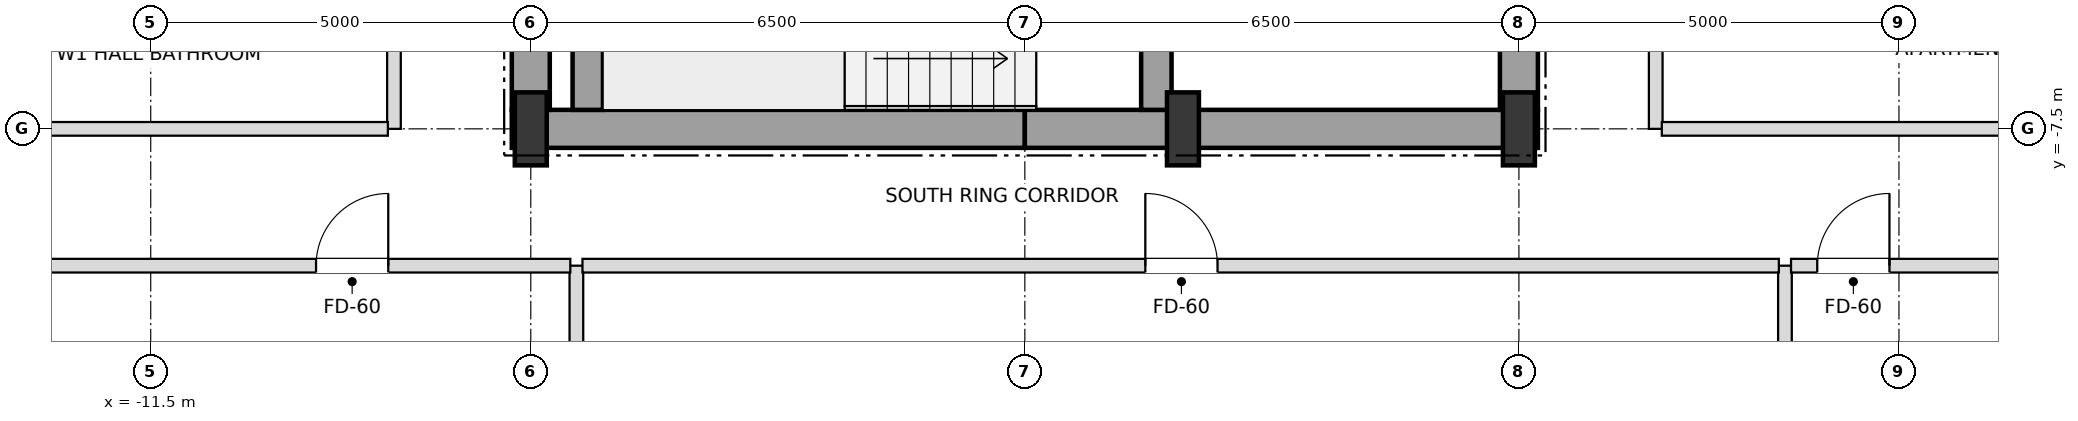
"""IFC4 building model, lengths in metres.
Left out: names, types, materials, properties, quantities, classifications, styles, units other than length and angle.
Written with IfcOpenShell. Run it as: python <this file> out.ifc"""

import sys

from ifc_helpers import new_model, si_unit, direction, frame, frame_2d, origin, origin_2d, place, context, subcontext, project, spatial, rectangle, i_section, extrude, element, fill, save


model = new_model("IFC4")
c1 = context("Model", 3, precision=1e-05, world=origin(), true_north=direction((0.0, 1.0)))
c2 = subcontext(c1, "Body", "Model", "MODEL_VIEW")
j1 = project(units=[si_unit("LENGTHUNIT", "METRE"), si_unit("PLANEANGLEUNIT", "RADIAN")], contexts=[c1])
p1 = place(None, origin())
s1 = spatial("IfcSite", under=j1, at=p1, CompositionType="ELEMENT")
p2 = place(p1, origin())
s2 = spatial("IfcBuilding", under=s1, at=p2, CompositionType="ELEMENT")
p3 = place(p2, frame((0.0, 0.0, 57.6)))
s3 = spatial("IfcBuildingStorey", under=s2, at=p3, CompositionType="ELEMENT", Elevation=57.6)
for number, where, z_axis, x_axis in (
    (1, (-6.5, -7.5, 0.0), (0.0, 0.0, 1.0), (1.0, 0.0, 0.0)),
    (2, (2.08, -7.5, 0.0), (0.0, 0.0, 1.0), (1.0, 0.0, 0.0)),
    (3, (6.5, -7.5, 0.0), (0.0, 0.0, 1.0), (1.0, 0.0, 0.0)),
):
    element("IfcColumn", number, at=place(p3, frame(where, z_axis=z_axis, x_axis=x_axis)), inside=s3, PredefinedType="COLUMN", context=c2, shape_type="SweptSolid", body=[
        extrude(i_section(OverallWidth=0.42, OverallDepth=0.96, WebThickness=0.022, FlangeThickness=0.034, at=origin_2d()), origin(), (0.0, 0.0, 1.0), 3.6),
    ])
for number, where, z_axis, x_axis in (
    (4, (-6.75, -7.5, 0.0), (0.0, 0.0, 1.0), (1.0, 0.0, 0.0)),
    (5, (0.0, -7.5, 0.0), (0.0, 0.0, 1.0), (1.0, 0.0, 0.0)),
):
    element("IfcWall", number, at=place(p3, frame(where, z_axis=z_axis, x_axis=x_axis)), inside=s3, PredefinedType="SHEAR", context=c2, shape_type="SweptSolid", body=[
        extrude(rectangle(XDim=6.75, YDim=0.5, at=frame_2d((3.375, 0.0))), origin(), (0.0, 0.0, 1.0), 3.38),
    ])
p4 = place(p3, frame((-6.5, -7.25, 0.0), z_axis=(0.0, 0.0, 1.0), x_axis=(0.0, 1.0, 0.0)))
e6 = element("IfcWall", 6, at=p4, inside=s3, PredefinedType="SHEAR", context=c2, shape_type="SweptSolid", body=[
    extrude(rectangle(XDim=3.55, YDim=0.5, at=frame_2d((1.775, 0.0))), origin(), (0.0, 0.0, 1.0), 3.38),
])
p5 = place(p3, frame((6.5, -7.25, 0.0), z_axis=(0.0, 0.0, 1.0), x_axis=(0.0, 1.0, 0.0)))
e7 = element("IfcWall", 7, at=p5, inside=s3, PredefinedType="SHEAR", context=c2, shape_type="SweptSolid", body=[
    extrude(rectangle(XDim=5.75, YDim=0.5, at=frame_2d((2.875, 0.0))), origin(), (0.0, 0.0, 1.0), 3.38),
])
p6 = place(p5, frame((0.85, 0.0, 0.0)))
e8 = element("IfcOpeningElement", 8, at=p6, cuts=e7, PredefinedType="OPENING", context=c2, shape_type="SweptSolid", body=[
    extrude(rectangle(XDim=1.05, YDim=2.15, at=frame_2d((0.525, 1.075))), frame((0.0, 0.26, 0.0), z_axis=(0.0, -1.0, 0.0), x_axis=(1.0, 0.0, 0.0)), (0.0, 0.0, 1.0), 0.52),
])
p7 = place(p3, frame((-5.75, -7.25, 0.0), z_axis=(0.0, 0.0, 1.0), x_axis=(0.0, 1.0, 0.0)))
e9 = element("IfcWall", 9, at=p7, inside=s3, PredefinedType="SHEAR", context=c2, shape_type="SweptSolid", body=[
    extrude(rectangle(XDim=2.9, YDim=0.4, at=frame_2d((1.45, 0.0))), origin(), (0.0, 0.0, 1.0), 3.38),
])
p8 = place(p3, frame((1.73, -7.25, 0.0), z_axis=(0.0, 0.0, 1.0), x_axis=(0.0, 1.0, 0.0)))
e10 = element("IfcWall", 10, at=p8, inside=s3, PredefinedType="SHEAR", context=c2, shape_type="SweptSolid", body=[
    extrude(rectangle(XDim=3.3, YDim=0.4, at=frame_2d((1.65, 0.0))), origin(), (0.0, 0.0, 1.0), 3.38),
])
p9 = place(p8, frame((0.9, 0.0, 0.0)))
e11 = element("IfcOpeningElement", 11, at=p9, cuts=e10, PredefinedType="OPENING", context=c2, shape_type="SweptSolid", body=[
    extrude(rectangle(XDim=1.05, YDim=2.15, at=frame_2d((0.525, 1.075))), frame((0.0, 0.21, 0.0), z_axis=(0.0, -1.0, 0.0), x_axis=(1.0, 0.0, 0.0)), (0.0, 0.0, 1.0), 0.42),
])
p10 = place(p3, frame((-8.3, -7.5, 0.0), z_axis=(0.0, 0.0, 1.0), x_axis=(0.0, 1.0, 0.0)))
e12 = element("IfcWall", 12, at=p10, inside=s3, PredefinedType="PARTITIONING", context=c2, shape_type="SweptSolid", body=[
    extrude(rectangle(XDim=15.0, YDim=0.18, at=frame_2d((7.5, 0.0))), origin(), (0.0, 0.0, 1.0), 3.38),
])
p11 = place(p10, frame((3.475, 0.0, 0.0)))
e13 = element("IfcOpeningElement", 13, at=p11, cuts=e12, PredefinedType="OPENING", context=c2, shape_type="SweptSolid", body=[
    extrude(rectangle(XDim=0.95, YDim=2.15, at=frame_2d((0.475, 1.075))), frame((0.0, 0.1, 0.0), z_axis=(0.0, -1.0, 0.0), x_axis=(1.0, 0.0, 0.0)), (0.0, 0.0, 1.0), 0.2),
])
p12 = place(p3, frame((-5.9, -24.9, 0.0), z_axis=(0.0, 0.0, 1.0), x_axis=(0.0, 1.0, 0.0)))
e14 = element("IfcWall", 14, at=p12, inside=s3, PredefinedType="PARTITIONING", context=c2, shape_type="SweptSolid", body=[
    extrude(rectangle(XDim=15.6, YDim=0.18, at=frame_2d((7.8, 0.0))), origin(), (0.0, 0.0, 1.0), 2.816),
])
p13 = place(p3, frame((8.3, -7.5, 0.0), z_axis=(0.0, 0.0, 1.0), x_axis=(0.0, 1.0, 0.0)))
e15 = element("IfcWall", 15, at=p13, inside=s3, PredefinedType="PARTITIONING", context=c2, shape_type="SweptSolid", body=[
    extrude(rectangle(XDim=15.0, YDim=0.18, at=frame_2d((7.5, 0.0))), origin(), (0.0, 0.0, 1.0), 3.38),
])
p14 = place(p13, frame((3.475, 0.0, 0.0)))
e16 = element("IfcOpeningElement", 16, at=p14, cuts=e15, PredefinedType="OPENING", context=c2, shape_type="SweptSolid", body=[
    extrude(rectangle(XDim=0.95, YDim=2.15, at=frame_2d((0.475, 1.075))), frame((0.0, 0.1, 0.0), z_axis=(0.0, -1.0, 0.0), x_axis=(1.0, 0.0, 0.0)), (0.0, 0.0, 1.0), 0.2),
])
p15 = place(p3, frame((10.0, -24.9, 0.0), z_axis=(0.0, 0.0, 1.0), x_axis=(0.0, 1.0, 0.0)))
e17 = element("IfcWall", 17, at=p15, inside=s3, PredefinedType="PARTITIONING", context=c2, shape_type="SweptSolid", body=[
    extrude(rectangle(XDim=15.6, YDim=0.18, at=frame_2d((7.8, 0.0))), origin(), (0.0, 0.0, 1.0), 2.816),
])
p16 = place(p3, frame((-18.4, -9.3, 0.0), z_axis=(0.0, 0.0, 1.0), x_axis=(1.0, 0.0, 0.0)))
e18 = element("IfcWall", 18, at=p16, inside=s3, PredefinedType="PARTITIONING", context=c2, shape_type="SweptSolid", body=[
    extrude(rectangle(XDim=12.42, YDim=0.18, at=frame_2d((6.21, 0.0))), origin(), (0.0, 0.0, 1.0), 2.816),
])
p17 = place(p16, frame((9.075, 0.0, 0.0)))
e19 = element("IfcOpeningElement", 19, at=p17, cuts=e18, PredefinedType="OPENING", context=c2, shape_type="SweptSolid", body=[
    extrude(rectangle(XDim=0.95, YDim=2.15, at=frame_2d((0.475, 1.075))), frame((0.0, 0.1, 0.0), z_axis=(0.0, -1.0, 0.0), x_axis=(1.0, 0.0, 0.0)), (0.0, 0.0, 1.0), 0.2),
])
p18 = place(p3, frame((-5.82, -9.3, 0.0), z_axis=(0.0, 0.0, 1.0), x_axis=(1.0, 0.0, 0.0)))
e20 = element("IfcWall", 20, at=p18, inside=s3, PredefinedType="PARTITIONING", context=c2, shape_type="SweptSolid", body=[
    extrude(rectangle(XDim=15.74, YDim=0.18, at=frame_2d((7.87, 0.0))), origin(), (0.0, 0.0, 1.0), 2.816),
])
p19 = place(p18, frame((7.405, 0.0, 0.0)))
e21 = element("IfcOpeningElement", 21, at=p19, cuts=e20, PredefinedType="OPENING", context=c2, shape_type="SweptSolid", body=[
    extrude(rectangle(XDim=0.95, YDim=2.15, at=frame_2d((0.475, 1.075))), frame((0.0, 0.1, 0.0), z_axis=(0.0, -1.0, 0.0), x_axis=(1.0, 0.0, 0.0)), (0.0, 0.0, 1.0), 0.2),
])
p20 = place(p3, frame((10.08, -9.3, 0.0), z_axis=(0.0, 0.0, 1.0), x_axis=(1.0, 0.0, 0.0)))
e22 = element("IfcWall", 22, at=p20, inside=s3, PredefinedType="PARTITIONING", context=c2, shape_type="SweptSolid", body=[
    extrude(rectangle(XDim=8.32, YDim=0.18, at=frame_2d((4.16, 0.0))), origin(), (0.0, 0.0, 1.0), 2.816),
])
p21 = place(p20, frame((0.345, 0.0, 0.0)))
e23 = element("IfcOpeningElement", 23, at=p21, cuts=e22, PredefinedType="OPENING", context=c2, shape_type="SweptSolid", body=[
    extrude(rectangle(XDim=0.95, YDim=2.15, at=frame_2d((0.475, 1.075))), frame((0.0, 0.1, 0.0), z_axis=(0.0, -1.0, 0.0), x_axis=(1.0, 0.0, 0.0)), (0.0, 0.0, 1.0), 0.2),
])
for number, where, z_axis, x_axis in (
    (24, (-16.02, -7.5, 0.0), (0.0, 0.0, 1.0), (1.0, 0.0, 0.0)),
    (25, (8.38, -7.5, 0.0), (0.0, 0.0, 1.0), (1.0, 0.0, 0.0)),
):
    element("IfcWall", number, at=place(p3, frame(where, z_axis=z_axis, x_axis=x_axis)), inside=s3, PredefinedType="PARTITIONING", context=c2, shape_type="SweptSolid", body=[
        extrude(rectangle(XDim=7.64, YDim=0.18, at=frame_2d((3.82, 0.0))), origin(), (0.0, 0.0, 1.0), 2.816),
    ])
p22 = place(p17, origin())
e26 = element("IfcDoor", 26, at=p22, inside=s3, OperationType="SINGLE_SWING_RIGHT", PredefinedType="DOOR", context=c2, shape_type="SweptSolid", body=[
    extrude(rectangle(XDim=0.95, YDim=2.15, at=frame_2d((0.475, 1.075))), frame((0.0, 0.025, 0.0), z_axis=(0.0, -1.0, 0.0), x_axis=(1.0, 0.0, 0.0)), (0.0, 0.0, 1.0), 0.05),
])
fill(e19, e26)
p23 = place(p19, origin())
e27 = element("IfcDoor", 27, at=p23, inside=s3, OperationType="SINGLE_SWING_LEFT", PredefinedType="DOOR", context=c2, shape_type="SweptSolid", body=[
    extrude(rectangle(XDim=0.95, YDim=2.15, at=frame_2d((0.475, 1.075))), frame((0.0, 0.025, 0.0), z_axis=(0.0, -1.0, 0.0), x_axis=(1.0, 0.0, 0.0)), (0.0, 0.0, 1.0), 0.05),
])
fill(e21, e27)
p24 = place(p21, origin())
e28 = element("IfcDoor", 28, at=p24, inside=s3, OperationType="SINGLE_SWING_RIGHT", PredefinedType="DOOR", context=c2, shape_type="SweptSolid", body=[
    extrude(rectangle(XDim=0.95, YDim=2.15, at=frame_2d((0.475, 1.075))), frame((0.0, 0.025, 0.0), z_axis=(0.0, -1.0, 0.0), x_axis=(1.0, 0.0, 0.0)), (0.0, 0.0, 1.0), 0.05),
])
fill(e23, e28)
save(model, sys.argv[1])
